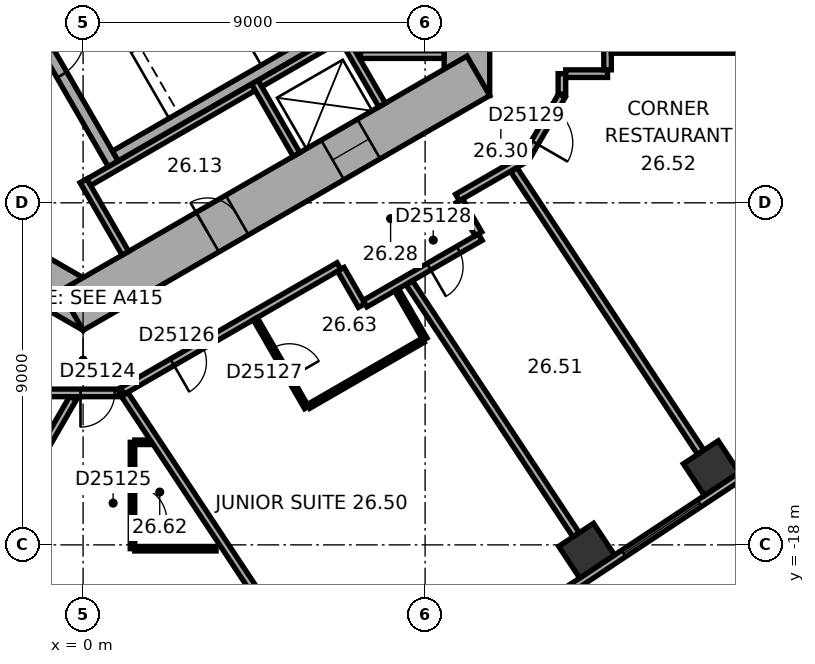
"""IFC4 building model, lengths in metres.
Left out: names, types, materials, properties, quantities, classifications, styles, units other than length and angle.
Written with IfcOpenShell. Run it as: python <this file> out.ifc"""

import sys

from ifc_helpers import new_model, si_unit, direction, frame, frame_2d, origin, origin_2d, place, context, subcontext, project, spatial, rectangle, extrude, element, fill, save


model = new_model("IFC4")
c1 = context("Model", 3, precision=1e-05, world=origin(), true_north=direction((0.0, 1.0)))
c2 = subcontext(c1, "Body", "Model", "MODEL_VIEW")
j1 = project(units=[si_unit("LENGTHUNIT", "METRE"), si_unit("PLANEANGLEUNIT", "RADIAN")], contexts=[c1])
p1 = place(None, origin())
s1 = spatial("IfcSite", under=j1, at=p1, CompositionType="ELEMENT")
p2 = place(p1, origin())
s2 = spatial("IfcBuilding", under=s1, at=p2, CompositionType="ELEMENT")
p3 = place(p2, frame((0.0, 0.0, 110.0)))
s3 = spatial("IfcBuildingStorey", under=s2, at=p3, CompositionType="ELEMENT", Elevation=110.0)
for number, where, z_axis, x_axis in (
    (1, (13.25, -18.152, 0.0), (0.0, 0.0, 1.0), (0.834, 0.552, 0.0)),
    (2, (16.531, -15.981, 0.0), (0.0, 0.0, 1.0), (0.834, 0.552, 0.0)),
):
    element("IfcColumn", number, at=place(p3, frame(where, z_axis=z_axis, x_axis=x_axis)), inside=s3, PredefinedType="COLUMN", context=c2, shape_type="SweptSolid", body=[
        extrude(rectangle(XDim=1.1, YDim=1.0, at=origin_2d()), origin(), (0.0, 0.0, 1.0), 3.3),
    ])
p4 = place(p3, frame((10.1, -6.177, 0.0), z_axis=(0.0, 0.0, 1.0), x_axis=(0.0, 1.0, 0.0)))
e3 = element("IfcWall", 3, at=p4, inside=s3, PredefinedType="SHEAR", context=c2, shape_type="SweptSolid", body=[
    extrude(rectangle(XDim=12.355, YDim=1.2, at=frame_2d((6.177, 0.0))), origin(), (0.0, 0.0, 1.0), 3.3),
])
p5 = place(p4, frame((6.378, 0.0, 0.0)))
e4 = element("IfcOpeningElement", 4, at=p5, cuts=e3, PredefinedType="OPENING", context=c2, shape_type="SweptSolid", body=[
    extrude(rectangle(XDim=1.5, YDim=2.1, at=frame_2d((0.75, 1.05))), frame((0.0, 0.61, 0.0), z_axis=(0.0, -1.0, 0.0), x_axis=(1.0, 0.0, 0.0)), (0.0, 0.0, 1.0), 1.22),
])
p6 = place(p4, frame((1.828, 0.0, 0.0)))
e5 = element("IfcOpeningElement", 5, at=p6, cuts=e3, PredefinedType="OPENING", context=c2, shape_type="SweptSolid", body=[
    extrude(rectangle(XDim=1.1, YDim=2.1, at=frame_2d((0.55, 1.05))), frame((0.0, 0.61, 0.0), z_axis=(0.0, -1.0, 0.0), x_axis=(1.0, 0.0, 0.0)), (0.0, 0.0, 1.0), 1.22),
])
p7 = place(p4, frame((4.427, 0.0, 0.0)))
e6 = element("IfcOpeningElement", 6, at=p7, cuts=e3, PredefinedType="OPENING", context=c2, shape_type="SweptSolid", body=[
    extrude(rectangle(XDim=1.1, YDim=2.1, at=frame_2d((0.55, 1.05))), frame((0.0, 0.61, 0.0), z_axis=(0.0, -1.0, 0.0), x_axis=(1.0, 0.0, 0.0)), (0.0, 0.0, 1.0), 1.22),
])
p8 = place(p3, frame((-10.4, -5.658, 0.0), z_axis=(0.0, 0.0, 1.0), x_axis=(0.866021384402, -0.500006961711, 0.0)))
e7 = element("IfcWall", 7, at=p8, inside=s3, PredefinedType="SHEAR", context=c2, shape_type="SweptSolid", body=[
    extrude(rectangle(XDim=12.355, YDim=1.2, at=frame_2d((6.178, 0.0))), origin(), (0.0, 0.0, 1.0), 3.3),
])
p9 = place(p8, frame((6.378, 0.0, 0.0)))
e8 = element("IfcOpeningElement", 8, at=p9, cuts=e7, PredefinedType="OPENING", context=c2, shape_type="SweptSolid", body=[
    extrude(rectangle(XDim=1.5, YDim=2.1, at=frame_2d((0.75, 1.05))), frame((0.0, 0.61, 0.0), z_axis=(0.0, -1.0, 0.0), x_axis=(1.0, 0.0, 0.0)), (0.0, 0.0, 1.0), 1.22),
])
p10 = place(p8, frame((1.928, 0.0, 0.0)))
e9 = element("IfcOpeningElement", 9, at=p10, cuts=e7, PredefinedType="OPENING", context=c2, shape_type="SweptSolid", body=[
    extrude(rectangle(XDim=0.9, YDim=2.1, at=frame_2d((0.45, 1.05))), frame((0.0, 0.61, 0.0), z_axis=(0.0, -1.0, 0.0), x_axis=(1.0, 0.0, 0.0)), (0.0, 0.0, 1.0), 1.22),
])
p11 = place(p8, frame((4.528, 0.0, 0.0)))
e10 = element("IfcOpeningElement", 10, at=p11, cuts=e7, PredefinedType="OPENING", context=c2, shape_type="SweptSolid", body=[
    extrude(rectangle(XDim=0.9, YDim=2.1, at=frame_2d((0.45, 1.05))), frame((0.0, 0.61, 0.0), z_axis=(0.0, -1.0, 0.0), x_axis=(1.0, 0.0, 0.0)), (0.0, 0.0, 1.0), 1.22),
])
p12 = place(p3, frame((-0.3, -11.836, 0.0), z_axis=(0.0, 0.0, 1.0), x_axis=(0.866021384402, 0.500006961711, 0.0)))
e11 = element("IfcWall", 11, at=p12, inside=s3, PredefinedType="SHEAR", context=c2, shape_type="SweptSolid", body=[
    extrude(rectangle(XDim=12.355, YDim=1.2, at=frame_2d((6.178, 0.0))), origin(), (0.0, 0.0, 1.0), 3.3),
])
p13 = place(p12, frame((4.128, 0.0, 0.0)))
e12 = element("IfcOpeningElement", 12, at=p13, cuts=e11, PredefinedType="OPENING", context=c2, shape_type="SweptSolid", body=[
    extrude(rectangle(XDim=0.9, YDim=2.1, at=frame_2d((0.45, 1.05))), frame((0.0, 0.61, 0.0), z_axis=(0.0, -1.0, 0.0), x_axis=(1.0, 0.0, 0.0)), (0.0, 0.0, 1.0), 1.22),
])
p14 = place(p12, frame((7.928, 0.0, 0.0)))
e13 = element("IfcOpeningElement", 13, at=p14, cuts=e11, PredefinedType="OPENING", context=c2, shape_type="SweptSolid", body=[
    extrude(rectangle(XDim=1.1, YDim=2.1, at=frame_2d((0.55, 1.05))), frame((0.0, 0.61, 0.0), z_axis=(0.0, -1.0, 0.0), x_axis=(1.0, 0.0, 0.0)), (0.0, 0.0, 1.0), 1.22),
])
p15 = place(p3, frame((3.083, -25.601, 0.0), z_axis=(0.0, 0.0, 1.0), x_axis=(0.833884295743, 0.551939291329, 0.0)))
e14 = element("IfcWall", 14, at=p15, inside=s3, PredefinedType="STANDARD", context=c2, shape_type="SweptSolid", body=[
    extrude(rectangle(XDim=21.246, YDim=0.2, at=frame_2d((10.623, 0.0))), origin(), (0.0, 0.0, 1.0), 3.3),
])
p16 = place(p15, frame((1.553, 0.0, 0.8)))
e15 = element("IfcOpeningElement", 15, at=p16, cuts=e14, PredefinedType="OPENING", context=c2, shape_type="SweptSolid", body=[
    extrude(rectangle(XDim=2.4, YDim=1.7, at=frame_2d((1.2, 0.85))), frame((0.0, 0.11, 0.0), z_axis=(0.0, -1.0, 0.0), x_axis=(1.0, 0.0, 0.0)), (0.0, 0.0, 1.0), 0.22),
])
p17 = place(p15, frame((5.488, 0.0, 0.8)))
e16 = element("IfcOpeningElement", 16, at=p17, cuts=e14, PredefinedType="OPENING", context=c2, shape_type="SweptSolid", body=[
    extrude(rectangle(XDim=2.4, YDim=1.7, at=frame_2d((1.2, 0.85))), frame((0.0, 0.11, 0.0), z_axis=(0.0, -1.0, 0.0), x_axis=(1.0, 0.0, 0.0)), (0.0, 0.0, 1.0), 0.22),
])
p18 = place(p15, frame((9.422, 0.0, 0.8)))
e17 = element("IfcOpeningElement", 17, at=p18, cuts=e14, PredefinedType="OPENING", context=c2, shape_type="SweptSolid", body=[
    extrude(rectangle(XDim=2.4, YDim=1.7, at=frame_2d((1.2, 0.85))), frame((0.0, 0.11, 0.0), z_axis=(0.0, -1.0, 0.0), x_axis=(1.0, 0.0, 0.0)), (0.0, 0.0, 1.0), 0.22),
])
p19 = place(p15, frame((13.357, 0.0, 0.8)))
e18 = element("IfcOpeningElement", 18, at=p19, cuts=e14, PredefinedType="OPENING", context=c2, shape_type="SweptSolid", body=[
    extrude(rectangle(XDim=2.4, YDim=1.7, at=frame_2d((1.2, 0.85))), frame((0.0, 0.11, 0.0), z_axis=(0.0, -1.0, 0.0), x_axis=(1.0, 0.0, 0.0)), (0.0, 0.0, 1.0), 0.22),
])
p20 = place(p15, frame((17.291, 0.0, 0.8)))
e19 = element("IfcOpeningElement", 19, at=p20, cuts=e14, PredefinedType="OPENING", context=c2, shape_type="SweptSolid", body=[
    extrude(rectangle(XDim=2.4, YDim=1.7, at=frame_2d((1.2, 0.85))), frame((0.0, 0.11, 0.0), z_axis=(0.0, -1.0, 0.0), x_axis=(1.0, 0.0, 0.0)), (0.0, 0.0, 1.0), 0.22),
])
p21 = place(p3, frame((7.4, -5.2, 0.0), z_axis=(0.0, 0.0, 1.0), x_axis=(0.0, 1.0, 0.0)))
e20 = element("IfcWall", 20, at=p21, inside=s3, PredefinedType="PARTITIONING", context=c2, shape_type="SweptSolid", body=[
    extrude(rectangle(XDim=5.4, YDim=0.2, at=frame_2d((2.7, 0.0))), origin(), (0.0, 0.0, 1.0), 3.05),
])
p22 = place(p3, frame((7.3, -5.1, 0.0), z_axis=(0.0, 0.0, 1.0), x_axis=(1.0, 0.0, 0.0)))
e21 = element("IfcWall", 21, at=p22, inside=s3, PredefinedType="PARTITIONING", context=c2, shape_type="SweptSolid", body=[
    extrude(rectangle(XDim=2.2, YDim=0.2, at=frame_2d((1.1, 0.0))), origin(), (0.0, 0.0, 1.0), 3.05),
])
p23 = place(p3, frame((-0.024, -8.559, 0.0), z_axis=(0.0, 0.0, 1.0), x_axis=(0.866026010844, 0.49999894854, 0.0)))
e22 = element("IfcWall", 22, at=p23, inside=s3, PredefinedType="PARTITIONING", context=c2, shape_type="SweptSolid", body=[
    extrude(rectangle(XDim=8.0, YDim=0.2, at=frame_2d((4.0, 0.0))), origin(), (0.0, 0.0, 1.0), 3.05),
])
for number, where, z_axis, x_axis in (
    (23, (0.013, -8.422, 0.0), (0.0, 0.0, 1.0), (0.5, -0.866, 0.0)),
    (24, (4.516, -5.822, 0.0), (0.0, 0.0, 1.0), (0.5, -0.866, 0.0)),
    (25, (6.768, -4.522, 0.0), (0.0, 0.0, 1.0), (0.5, -0.866, 0.0)),
):
    element("IfcWall", number, at=place(p3, frame(where, z_axis=z_axis, x_axis=x_axis)), inside=s3, PredefinedType="PARTITIONING", context=c2, shape_type="SweptSolid", body=[
        extrude(rectangle(XDim=2.2, YDim=0.2, at=frame_2d((1.1, 0.0))), origin(), (0.0, 0.0, 1.0), 3.05),
    ])
p24 = place(p3, frame((-1.558, -3.902, 0.0), z_axis=(0.0, 0.0, 1.0), x_axis=(0.499977259774, -0.866038532462, 0.0)))
e26 = element("IfcWall", 26, at=p24, inside=s3, PredefinedType="SHEAR", context=c2, shape_type="SweptSolid", body=[
    extrude(rectangle(XDim=4.7, YDim=0.3, at=frame_2d((2.35, 0.0))), origin(), (0.0, 0.0, 1.0), 3.05),
])
p25 = place(p24, frame((0.8, 0.0, 0.0)))
e27 = element("IfcOpeningElement", 27, at=p25, cuts=e26, PredefinedType="OPENING", context=c2, shape_type="SweptSolid", body=[
    extrude(rectangle(XDim=1.2, YDim=2.1, at=frame_2d((0.6, 1.05))), frame((0.0, 0.16, 0.0), z_axis=(0.0, -1.0, 0.0), x_axis=(1.0, 0.0, 0.0)), (0.0, 0.0, 1.0), 0.32),
])
p26 = place(p3, frame((0.847, -7.767, 0.0), z_axis=(0.0, 0.0, 1.0), x_axis=(0.866027801685, 0.499995846692, 0.0)))
e28 = element("IfcWall", 28, at=p26, inside=s3, PredefinedType="SHEAR", context=c2, shape_type="SweptSolid", body=[
    extrude(rectangle(XDim=7.06, YDim=0.3, at=frame_2d((3.53, 0.0))), origin(), (0.0, 0.0, 1.0), 3.05),
])
p27 = place(p3, frame((-5.052, -22.429, 0.0), z_axis=(0.0, 0.0, 1.0), x_axis=(0.500004329283, 0.866022904257, 0.0)))
e29 = element("IfcWall", 29, at=p27, inside=s3, PredefinedType="PARTITIONING", context=c2, shape_type="SweptSolid", body=[
    extrude(rectangle(XDim=9.572, YDim=0.2, at=frame_2d((4.786, 0.0))), origin(), (0.0, 0.0, 1.0), 3.05),
])
p28 = place(p3, frame((-0.91, -14.001, 0.0), z_axis=(0.0, 0.0, 1.0), x_axis=(1.0, 0.0, 0.0)))
e30 = element("IfcWall", 30, at=p28, inside=s3, PredefinedType="PARTITIONING", context=c2, shape_type="SweptSolid", body=[
    extrude(rectangle(XDim=1.86, YDim=0.2, at=frame_2d((0.93, 0.0))), origin(), (0.0, 0.0, 1.0), 3.05),
])
p29 = place(p28, frame((0.842, 0.0, 0.0)))
e31 = element("IfcOpeningElement", 31, at=p29, cuts=e30, PredefinedType="OPENING", context=c2, shape_type="SweptSolid", body=[
    extrude(rectangle(XDim=0.9, YDim=2.1, at=frame_2d((0.45, 1.05))), frame((0.0, 0.11, 0.0), z_axis=(0.0, -1.0, 0.0), x_axis=(1.0, 0.0, 0.0)), (0.0, 0.0, 1.0), 0.22),
])
p30 = place(p3, frame((1.033, -13.953, 0.0), z_axis=(0.0, 0.0, 1.0), x_axis=(0.866017531406, 0.500013635111, 0.0)))
e32 = element("IfcWall", 32, at=p30, inside=s3, PredefinedType="PARTITIONING", context=c2, shape_type="SweptSolid", body=[
    extrude(rectangle(XDim=6.58, YDim=0.2, at=frame_2d((3.29, 0.0))), origin(), (0.0, 0.0, 1.0), 3.05),
])
p31 = place(p30, frame((1.515, 0.0, 0.0)))
e33 = element("IfcOpeningElement", 33, at=p31, cuts=e32, PredefinedType="OPENING", context=c2, shape_type="SweptSolid", body=[
    extrude(rectangle(XDim=0.9, YDim=2.1, at=frame_2d((0.45, 1.05))), frame((0.0, 0.11, 0.0), z_axis=(0.0, -1.0, 0.0), x_axis=(1.0, 0.0, 0.0)), (0.0, 0.0, 1.0), 0.22),
])
p32 = place(p3, frame((1.3, -18.101, 0.0), z_axis=(0.0, 0.0, 1.0), x_axis=(0.0, 1.0, 0.0)))
e34 = element("IfcWall", 34, at=p32, inside=s3, PredefinedType="PARTITIONING", context=c2, shape_type="SweptSolid", body=[
    extrude(rectangle(XDim=2.8, YDim=0.12, at=frame_2d((1.4, 0.0))), origin(), (0.0, 0.0, 1.0), 3.05),
])
p33 = place(p32, frame((0.75, 0.0, 0.0)))
e35 = element("IfcOpeningElement", 35, at=p33, cuts=e34, PredefinedType="OPENING", context=c2, shape_type="SweptSolid", body=[
    extrude(rectangle(XDim=0.9, YDim=2.1, at=frame_2d((0.45, 1.05))), frame((0.0, 0.07, 0.0), z_axis=(0.0, -1.0, 0.0), x_axis=(1.0, 0.0, 0.0)), (0.0, 0.0, 1.0), 0.14),
])
p34 = place(p3, frame((1.36, -15.301, 0.0), z_axis=(0.0, 0.0, 1.0), x_axis=(1.0, 0.0, 0.0)))
e36 = element("IfcWall", 36, at=p34, inside=s3, PredefinedType="PARTITIONING", context=c2, shape_type="SweptSolid", body=[
    extrude(rectangle(XDim=0.416, YDim=0.12, at=frame_2d((0.208, 0.0))), origin(), (0.0, 0.0, 1.0), 3.05),
])
p35 = place(p3, frame((3.5, -18.101, 0.0), z_axis=(0.0, 0.0, 1.0), x_axis=(-1.0, 0.0, 0.0)))
e37 = element("IfcWall", 37, at=p35, inside=s3, PredefinedType="PARTITIONING", context=c2, shape_type="SweptSolid", body=[
    extrude(rectangle(XDim=2.14, YDim=0.12, at=frame_2d((1.07, 0.0))), origin(), (0.0, 0.0, 1.0), 3.05),
])
p36 = place(p3, frame((5.881, -14.387, 0.0), z_axis=(0.0, 0.0, 1.0), x_axis=(-0.500048589285, 0.86599734893, 0.0)))
e38 = element("IfcWall", 38, at=p36, inside=s3, PredefinedType="PARTITIONING", context=c2, shape_type="SweptSolid", body=[
    extrude(rectangle(XDim=2.7, YDim=0.12, at=frame_2d((1.35, 0.0))), origin(), (0.0, 0.0, 1.0), 3.05),
])
p37 = place(p36, frame((0.9, 0.0, 0.0)))
e39 = element("IfcOpeningElement", 39, at=p37, cuts=e38, PredefinedType="OPENING", context=c2, shape_type="SweptSolid", body=[
    extrude(rectangle(XDim=0.9, YDim=2.1, at=frame_2d((0.45, 1.05))), frame((0.0, 0.07, 0.0), z_axis=(0.0, -1.0, 0.0), x_axis=(1.0, 0.0, 0.0)), (0.0, 0.0, 1.0), 0.14),
])
p38 = place(p3, frame((6.412, -22.079, 0.0), z_axis=(0.0, 0.0, 1.0), x_axis=(-0.551919507115, 0.83389739037, 0.0)))
e40 = element("IfcWall", 40, at=p38, inside=s3, PredefinedType="PARTITIONING", context=c2, shape_type="SweptSolid", body=[
    extrude(rectangle(XDim=9.635, YDim=0.2, at=frame_2d((4.817, 0.0))), origin(), (0.0, 0.0, 1.0), 3.05),
])
p39 = place(p3, frame((6.782, -10.749, 0.0), z_axis=(0.0, 0.0, 1.0), x_axis=(0.500074377092, -0.865982457891, 0.0)))
e41 = element("IfcWall", 41, at=p39, inside=s3, PredefinedType="PARTITIONING", context=c2, shape_type="SweptSolid", body=[
    extrude(rectangle(XDim=1.101, YDim=0.2, at=frame_2d((0.55, 0.0))), origin(), (0.0, 0.0, 1.0), 3.05),
])
p40 = place(p3, frame((7.419, -11.653, 0.0), z_axis=(0.0, 0.0, 1.0), x_axis=(0.866038154057, 0.49997791523, 0.0)))
e42 = element("IfcWall", 42, at=p40, inside=s3, PredefinedType="PARTITIONING", context=c2, shape_type="SweptSolid", body=[
    extrude(rectangle(XDim=3.502, YDim=0.2, at=frame_2d((1.751, 0.0))), origin(), (0.0, 0.0, 1.0), 3.05),
])
p41 = place(p40, frame((1.94, 0.0, 0.0)))
e43 = element("IfcOpeningElement", 43, at=p41, cuts=e42, PredefinedType="OPENING", context=c2, shape_type="SweptSolid", body=[
    extrude(rectangle(XDim=0.9, YDim=2.1, at=frame_2d((0.45, 1.05))), frame((0.0, 0.11, 0.0), z_axis=(0.0, -1.0, 0.0), x_axis=(1.0, 0.0, 0.0)), (0.0, 0.0, 1.0), 0.22),
])
p42 = place(p3, frame((8.249, -11.289, 0.0), z_axis=(0.0, 0.0, 1.0), x_axis=(0.499957405522, -0.866049994321, 0.0)))
e44 = element("IfcWall", 44, at=p42, inside=s3, PredefinedType="PARTITIONING", context=c2, shape_type="SweptSolid", body=[
    extrude(rectangle(XDim=1.499, YDim=0.12, at=frame_2d((0.75, 0.0))), origin(), (0.0, 0.0, 1.0), 3.05),
])
p43 = place(p3, frame((8.946, -12.617, 0.0), z_axis=(0.0, 0.0, 1.0), x_axis=(-0.865989304205, -0.500062521093, 0.0)))
e45 = element("IfcWall", 45, at=p43, inside=s3, PredefinedType="PARTITIONING", context=c2, shape_type="SweptSolid", body=[
    extrude(rectangle(XDim=3.48, YDim=0.12, at=frame_2d((1.74, 0.0))), origin(), (0.0, 0.0, 1.0), 3.05),
])
p44 = place(p3, frame((9.852, -8.861, 0.0), z_axis=(0.0, 0.0, 1.0), x_axis=(0.866013291437, 0.500020978615, 0.0)))
e46 = element("IfcWall", 46, at=p44, inside=s3, PredefinedType="PARTITIONING", context=c2, shape_type="SweptSolid", body=[
    extrude(rectangle(XDim=2.077, YDim=0.2, at=frame_2d((1.038, 0.0))), origin(), (0.0, 0.0, 1.0), 3.05),
])
p45 = place(p3, frame((10.402, -9.815, 0.0), z_axis=(0.0, 0.0, 1.0), x_axis=(-0.499968756647, 0.866043441391, 0.0)))
e47 = element("IfcWall", 47, at=p45, inside=s3, PredefinedType="PARTITIONING", context=c2, shape_type="SweptSolid", body=[
    extrude(rectangle(XDim=1.001, YDim=0.2, at=frame_2d((0.5, 0.0))), origin(), (0.0, 0.0, 1.0), 3.05),
])
p46 = place(p3, frame((11.67, -7.788, 0.0), z_axis=(0.0, 0.0, 1.0), x_axis=(0.500063286585, 0.865988862174, 0.0)))
e48 = element("IfcWall", 48, at=p46, inside=s3, PredefinedType="PARTITIONING", context=c2, shape_type="SweptSolid", body=[
    extrude(rectangle(XDim=1.86, YDim=0.2, at=frame_2d((0.93, 0.0))), origin(), (0.0, 0.0, 1.0), 3.05),
])
p47 = place(p46, frame((0.43, 0.0, 0.0)))
e49 = element("IfcOpeningElement", 49, at=p47, cuts=e48, PredefinedType="OPENING", context=c2, shape_type="SweptSolid", body=[
    extrude(rectangle(XDim=1.0, YDim=2.1, at=frame_2d((0.5, 1.05))), frame((0.0, 0.11, 0.0), z_axis=(0.0, -1.0, 0.0), x_axis=(1.0, 0.0, 0.0)), (0.0, 0.0, 1.0), 0.22),
])
p48 = place(p3, frame((12.6, -6.138, 0.0), z_axis=(0.0, 0.0, 1.0), x_axis=(0.0, 1.0, 0.0)))
e50 = element("IfcWall", 50, at=p48, inside=s3, PredefinedType="PARTITIONING", context=c2, shape_type="SweptSolid", body=[
    extrude(rectangle(XDim=0.537, YDim=0.2, at=frame_2d((0.268, 0.0))), origin(), (0.0, 0.0, 1.0), 3.05),
])
p49 = place(p3, frame((12.7, -5.601, 0.0), z_axis=(0.0, 0.0, 1.0), x_axis=(1.0, 0.0, 0.0)))
e51 = element("IfcWall", 51, at=p49, inside=s3, PredefinedType="PARTITIONING", context=c2, shape_type="SweptSolid", body=[
    extrude(rectangle(XDim=1.101, YDim=0.2, at=frame_2d((0.551, 0.0))), origin(), (0.0, 0.0, 1.0), 3.05),
])
p50 = place(p3, frame((12.974, -17.735, 0.0), z_axis=(0.0, 0.0, 1.0), x_axis=(-0.55192625685, 0.833892922982, 0.0)))
e52 = element("IfcWall", 52, at=p50, inside=s3, PredefinedType="PARTITIONING", context=c2, shape_type="SweptSolid", body=[
    extrude(rectangle(XDim=7.95, YDim=0.2, at=frame_2d((3.975, 0.0))), origin(), (0.0, 0.0, 1.0), 3.05),
])
p51 = place(p3, frame((13.801, -5.501, 0.0), z_axis=(0.0, 0.0, 1.0), x_axis=(0.0, 1.0, 0.0)))
e53 = element("IfcWall", 53, at=p51, inside=s3, PredefinedType="PARTITIONING", context=c2, shape_type="SweptSolid", body=[
    extrude(rectangle(XDim=5.702, YDim=0.2, at=frame_2d((2.851, 0.0))), origin(), (0.0, 0.0, 1.0), 3.05),
])
p52 = place(p51, frame((2.619, 0.0, 0.0)))
e54 = element("IfcOpeningElement", 54, at=p52, cuts=e53, PredefinedType="OPENING", context=c2, shape_type="SweptSolid", body=[
    extrude(rectangle(XDim=1.0, YDim=2.1, at=frame_2d((0.5, 1.05))), frame((0.0, 0.11, 0.0), z_axis=(0.0, -1.0, 0.0), x_axis=(1.0, 0.0, 0.0)), (0.0, 0.0, 1.0), 0.22),
])
p53 = place(p3, frame((13.901, -4.965, 0.0), z_axis=(0.0, 0.0, 1.0), x_axis=(1.0, 0.0, 0.0)))
e55 = element("IfcWall", 55, at=p53, inside=s3, PredefinedType="PARTITIONING", context=c2, shape_type="SweptSolid", body=[
    extrude(rectangle(XDim=8.049, YDim=0.2, at=frame_2d((4.024, 0.0))), origin(), (0.0, 0.0, 1.0), 3.05),
])
p54 = place(p3, frame((16.255, -15.564, 0.0), z_axis=(0.0, 0.0, 1.0), x_axis=(-0.55192208744, 0.833895682562, 0.0)))
e56 = element("IfcWall", 56, at=p54, inside=s3, PredefinedType="PARTITIONING", context=c2, shape_type="SweptSolid", body=[
    extrude(rectangle(XDim=8.913, YDim=0.2, at=frame_2d((4.457, 0.0))), origin(), (0.0, 0.0, 1.0), 2.6),
])
p55 = place(p19, origin())
e57 = element("IfcWindow", 57, at=p55, inside=s3, PartitioningType="SINGLE_PANEL", PredefinedType="WINDOW", context=c2, shape_type="SweptSolid", body=[
    extrude(rectangle(XDim=2.4, YDim=1.7, at=frame_2d((1.2, 0.85))), frame((0.0, 0.03, 0.0), z_axis=(0.0, -1.0, 0.0), x_axis=(1.0, 0.0, 0.0)), (0.0, 0.0, 1.0), 0.06),
])
fill(e18, e57)
p56 = place(p25, origin())
e58 = element("IfcDoor", 58, at=p56, inside=s3, OperationType="SINGLE_SWING_RIGHT", PredefinedType="DOOR", context=c2, shape_type="SweptSolid", body=[
    extrude(rectangle(XDim=1.2, YDim=2.1, at=frame_2d((0.6, 1.05))), frame((0.0, 0.025, 0.0), z_axis=(0.0, -1.0, 0.0), x_axis=(1.0, 0.0, 0.0)), (0.0, 0.0, 1.0), 0.05),
])
fill(e27, e58)
p57 = place(p13, origin())
e59 = element("IfcDoor", 59, at=p57, inside=s3, OperationType="SINGLE_SWING_LEFT", PredefinedType="DOOR", context=c2, shape_type="SweptSolid", body=[
    extrude(rectangle(XDim=0.9, YDim=2.1, at=frame_2d((0.45, 1.05))), frame((0.0, 0.025, 0.0), z_axis=(0.0, -1.0, 0.0), x_axis=(1.0, 0.0, 0.0)), (0.0, 0.0, 1.0), 0.05),
])
fill(e12, e59)
p58 = place(p14, origin())
e60 = element("IfcDoor", 60, at=p58, inside=s3, OperationType="DOUBLE_DOOR_SLIDING", PredefinedType="DOOR", context=c2, shape_type="SweptSolid", body=[
    extrude(rectangle(XDim=1.1, YDim=2.1, at=frame_2d((0.55, 1.05))), frame((0.0, 0.025, 0.0), z_axis=(0.0, -1.0, 0.0), x_axis=(1.0, 0.0, 0.0)), (0.0, 0.0, 1.0), 0.05),
])
fill(e13, e60)
p59 = place(p29, origin())
e61 = element("IfcDoor", 61, at=p59, inside=s3, OperationType="SINGLE_SWING_LEFT", PredefinedType="DOOR", context=c2, shape_type="SweptSolid", body=[
    extrude(rectangle(XDim=0.9, YDim=2.1, at=frame_2d((0.45, 1.05))), frame((0.0, 0.025, 0.0), z_axis=(0.0, -1.0, 0.0), x_axis=(1.0, 0.0, 0.0)), (0.0, 0.0, 1.0), 0.05),
])
fill(e31, e61)
p60 = place(p33, origin())
e62 = element("IfcDoor", 62, at=p60, inside=s3, OperationType="SINGLE_SWING_LEFT", PredefinedType="DOOR", context=c2, shape_type="SweptSolid", body=[
    extrude(rectangle(XDim=0.9, YDim=2.1, at=frame_2d((0.45, 1.05))), frame((0.0, 0.025, 0.0), z_axis=(0.0, -1.0, 0.0), x_axis=(1.0, 0.0, 0.0)), (0.0, 0.0, 1.0), 0.05),
])
fill(e35, e62)
p61 = place(p31, origin())
e63 = element("IfcDoor", 63, at=p61, inside=s3, OperationType="SINGLE_SWING_LEFT", PredefinedType="DOOR", context=c2, shape_type="SweptSolid", body=[
    extrude(rectangle(XDim=0.9, YDim=2.1, at=frame_2d((0.45, 1.05))), frame((0.0, 0.025, 0.0), z_axis=(0.0, -1.0, 0.0), x_axis=(1.0, 0.0, 0.0)), (0.0, 0.0, 1.0), 0.05),
])
fill(e33, e63)
p62 = place(p37, origin())
e64 = element("IfcDoor", 64, at=p62, inside=s3, OperationType="SINGLE_SWING_LEFT", PredefinedType="DOOR", context=c2, shape_type="SweptSolid", body=[
    extrude(rectangle(XDim=0.9, YDim=2.1, at=frame_2d((0.45, 1.05))), frame((0.0, 0.025, 0.0), z_axis=(0.0, -1.0, 0.0), x_axis=(1.0, 0.0, 0.0)), (0.0, 0.0, 1.0), 0.05),
])
fill(e39, e64)
p63 = place(p41, origin())
e65 = element("IfcDoor", 65, at=p63, inside=s3, OperationType="SINGLE_SWING_LEFT", PredefinedType="DOOR", context=c2, shape_type="SweptSolid", body=[
    extrude(rectangle(XDim=0.9, YDim=2.1, at=frame_2d((0.45, 1.05))), frame((0.0, 0.025, 0.0), z_axis=(0.0, -1.0, 0.0), x_axis=(1.0, 0.0, 0.0)), (0.0, 0.0, 1.0), 0.05),
])
fill(e43, e65)
p64 = place(p47, origin())
e66 = element("IfcDoor", 66, at=p64, inside=s3, OperationType="SINGLE_SWING_LEFT", PredefinedType="DOOR", context=c2, shape_type="SweptSolid", body=[
    extrude(rectangle(XDim=1.0, YDim=2.1, at=frame_2d((0.5, 1.05))), frame((0.0, 0.025, 0.0), z_axis=(0.0, -1.0, 0.0), x_axis=(1.0, 0.0, 0.0)), (0.0, 0.0, 1.0), 0.05),
])
fill(e49, e66)
save(model, sys.argv[1])
